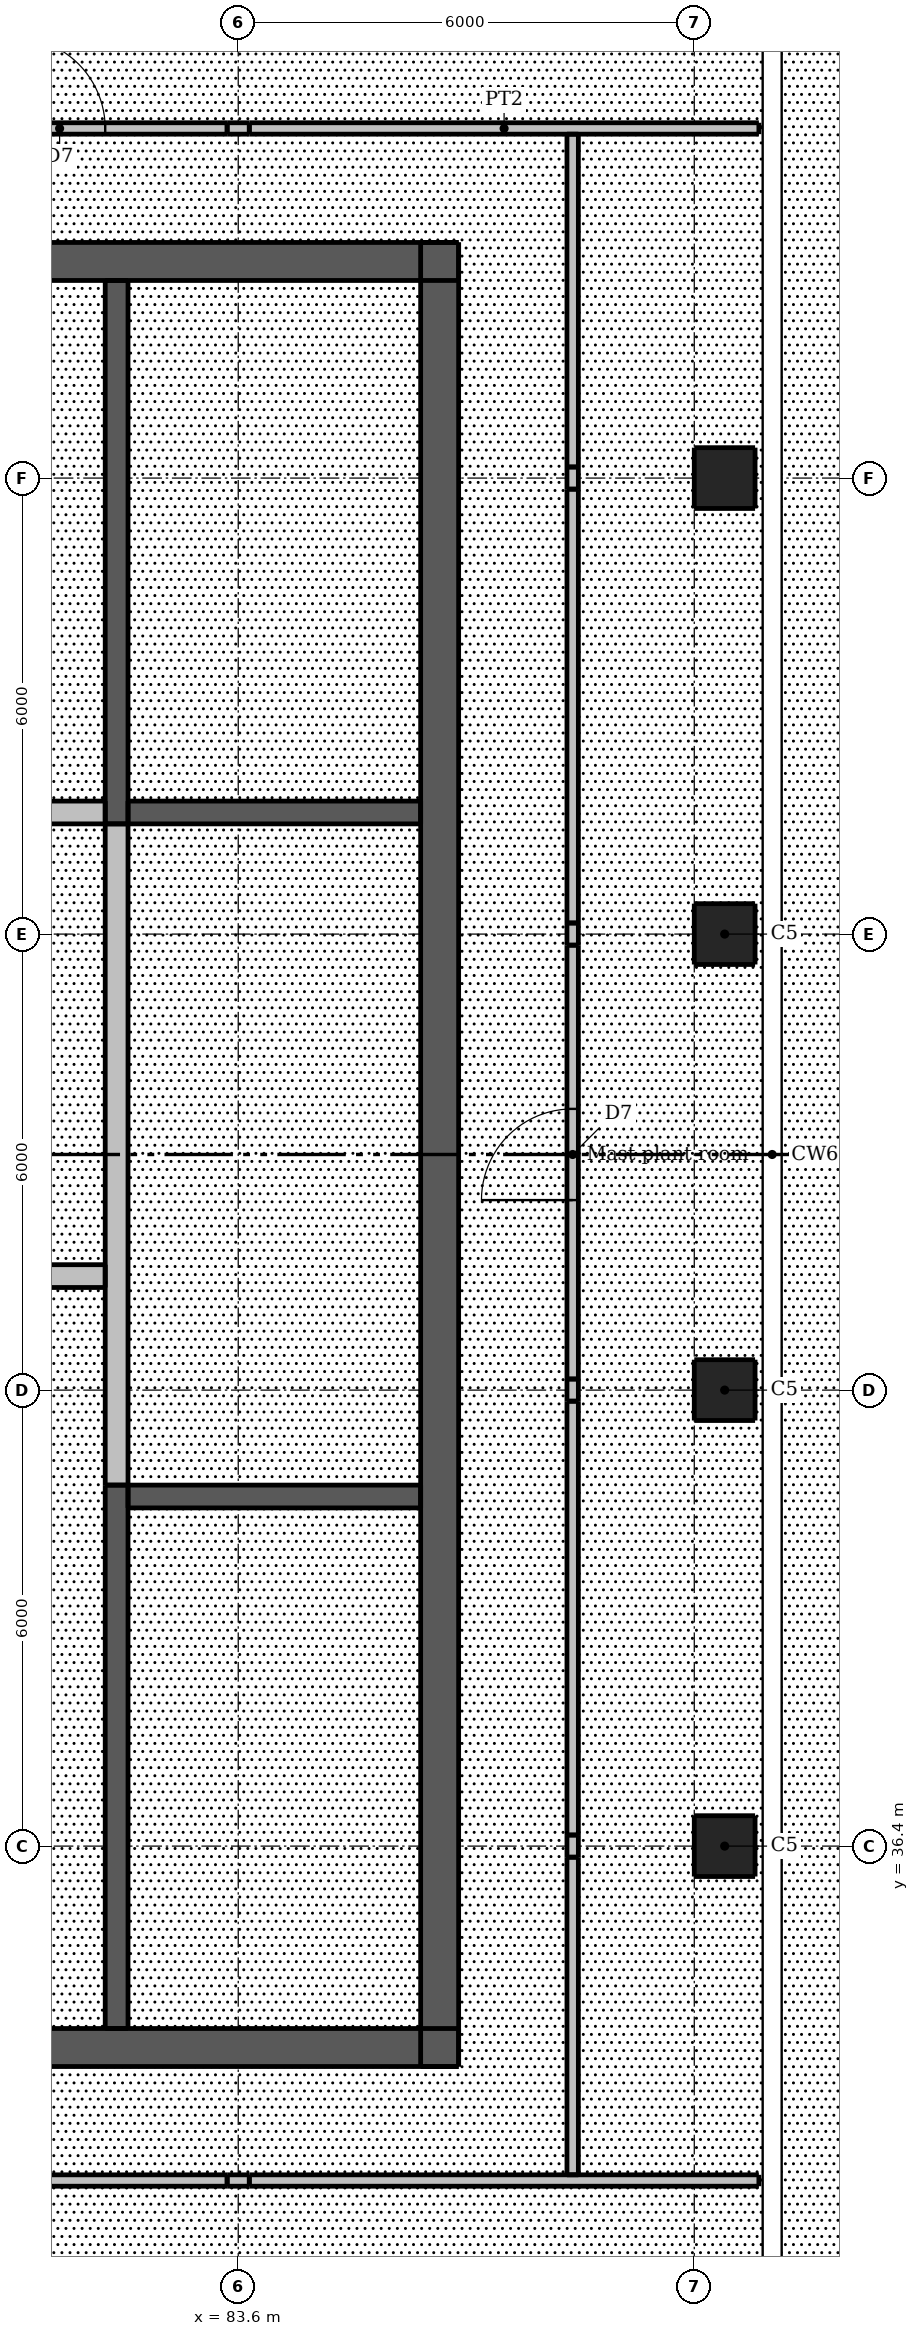
"""IFC4 building model, lengths in metres.
Left out: names, types, materials, properties, quantities, classifications, styles, units other than length and angle.
Written with IfcOpenShell. Run it as: python <this file> out.ifc"""

import sys

from ifc_helpers import new_model, si_unit, direction, frame, frame_2d, origin, origin_2d, place, context, subcontext, project, spatial, rectangle, extrude, element, fill, save


model = new_model("IFC4")
c1 = context("Model", 3, precision=1e-05, world=origin(), true_north=direction((0.0, 1.0)))
c2 = subcontext(c1, "Body", "Model", "MODEL_VIEW")
j1 = project(units=[si_unit("LENGTHUNIT", "METRE"), si_unit("PLANEANGLEUNIT", "RADIAN")], contexts=[c1])
p1 = place(None, origin())
s1 = spatial("IfcSite", under=j1, at=p1, CompositionType="ELEMENT")
p2 = place(p1, origin())
s2 = spatial("IfcBuilding", under=s1, at=p2, CompositionType="ELEMENT")
p3 = place(p2, frame((0.0, 0.0, 294.4)))
s3 = spatial("IfcBuildingStorey", under=s2, at=p3, CompositionType="ELEMENT", Elevation=294.4)
p4 = place(p3, frame((62.5, 33.75, 0.0), z_axis=(0.0, 0.0, 1.0), x_axis=(1.0, 0.0, 0.0)))
e1 = element("IfcWall", 1, at=p4, inside=s3, PredefinedType="SHEAR", context=c2, shape_type="SweptSolid", body=[
    extrude(rectangle(XDim=24.0, YDim=0.5, at=frame_2d((12.0, 0.0))), origin(), (0.0, 0.0, 1.0), 3.3),
])
p5 = place(p4, frame((1.875, 0.0, 0.0)))
e2 = element("IfcOpeningElement", 2, at=p5, cuts=e1, PredefinedType="OPENING", context=c2, shape_type="SweptSolid", body=[
    extrude(rectangle(XDim=1.1, YDim=2.1, at=frame_2d((0.55, 1.05))), frame((0.0, 0.26, 0.0), z_axis=(0.0, -1.0, 0.0), x_axis=(1.0, 0.0, 0.0)), (0.0, 0.0, 1.0), 0.52),
])
p6 = place(p4, frame((21.025, 0.0, 0.0)))
e3 = element("IfcOpeningElement", 3, at=p6, cuts=e1, PredefinedType="OPENING", context=c2, shape_type="SweptSolid", body=[
    extrude(rectangle(XDim=1.1, YDim=2.1, at=frame_2d((0.55, 1.05))), frame((0.0, 0.26, 0.0), z_axis=(0.0, -1.0, 0.0), x_axis=(1.0, 0.0, 0.0)), (0.0, 0.0, 1.0), 0.52),
])
p7 = place(p4, frame((11.55, 0.0, 0.0)))
e4 = element("IfcOpeningElement", 4, at=p7, cuts=e1, PredefinedType="OPENING", context=c2, shape_type="SweptSolid", body=[
    extrude(rectangle(XDim=0.9, YDim=2.1, at=frame_2d((0.45, 1.05))), frame((0.0, 0.26, 0.0), z_axis=(0.0, -1.0, 0.0), x_axis=(1.0, 0.0, 0.0)), (0.0, 0.0, 1.0), 0.52),
])
p8 = place(p3, frame((62.5, 57.25, 0.0), z_axis=(0.0, 0.0, 1.0), x_axis=(1.0, 0.0, 0.0)))
e5 = element("IfcWall", 5, at=p8, inside=s3, PredefinedType="SHEAR", context=c2, shape_type="SweptSolid", body=[
    extrude(rectangle(XDim=24.0, YDim=0.5, at=frame_2d((12.0, 0.0))), origin(), (0.0, 0.0, 1.0), 3.3),
])
p9 = place(p8, frame((21.025, 0.0, 0.0)))
e6 = element("IfcOpeningElement", 6, at=p9, cuts=e5, PredefinedType="OPENING", context=c2, shape_type="SweptSolid", body=[
    extrude(rectangle(XDim=1.1, YDim=2.1, at=frame_2d((0.55, 1.05))), frame((0.0, 0.26, 0.0), z_axis=(0.0, -1.0, 0.0), x_axis=(1.0, 0.0, 0.0)), (0.0, 0.0, 1.0), 0.52),
])
p10 = place(p8, frame((1.875, 0.0, 0.0)))
e7 = element("IfcOpeningElement", 7, at=p10, cuts=e5, PredefinedType="OPENING", context=c2, shape_type="SweptSolid", body=[
    extrude(rectangle(XDim=1.1, YDim=2.1, at=frame_2d((0.55, 1.05))), frame((0.0, 0.26, 0.0), z_axis=(0.0, -1.0, 0.0), x_axis=(1.0, 0.0, 0.0)), (0.0, 0.0, 1.0), 0.52),
])
p11 = place(p8, frame((11.55, 0.0, 0.0)))
e8 = element("IfcOpeningElement", 8, at=p11, cuts=e5, PredefinedType="OPENING", context=c2, shape_type="SweptSolid", body=[
    extrude(rectangle(XDim=0.9, YDim=2.1, at=frame_2d((0.45, 1.05))), frame((0.0, 0.26, 0.0), z_axis=(0.0, -1.0, 0.0), x_axis=(1.0, 0.0, 0.0)), (0.0, 0.0, 1.0), 0.52),
])
p12 = place(p3, frame((86.25, 33.5, 0.0), z_axis=(0.0, 0.0, 1.0), x_axis=(0.0, 1.0, 0.0)))
e9 = element("IfcWall", 9, at=p12, inside=s3, PredefinedType="SHEAR", context=c2, shape_type="SweptSolid", body=[
    extrude(rectangle(XDim=24.0, YDim=0.5, at=frame_2d((12.0, 0.0))), origin(), (0.0, 0.0, 1.0), 3.3),
])
p13 = place(p12, frame((11.55, 0.0, 0.0)))
e10 = element("IfcOpeningElement", 10, at=p13, cuts=e9, PredefinedType="OPENING", context=c2, shape_type="SweptSolid", body=[
    extrude(rectangle(XDim=0.9, YDim=2.1, at=frame_2d((0.45, 1.05))), frame((0.0, 0.26, 0.0), z_axis=(0.0, -1.0, 0.0), x_axis=(1.0, 0.0, 0.0)), (0.0, 0.0, 1.0), 0.52),
])
for number, where, z_axis, x_axis in (
    (11, (90.0, 36.4, 0.0), (0.0, 0.0, 1.0), (1.0, 0.0, 0.0)),
    (12, (90.0, 42.4, 0.0), (0.0, 0.0, 1.0), (1.0, 0.0, 0.0)),
    (13, (90.0, 48.4, 0.0), (0.0, 0.0, 1.0), (1.0, 0.0, 0.0)),
    (14, (90.0, 54.4, 0.0), (0.0, 0.0, 1.0), (1.0, 0.0, 0.0)),
):
    element("IfcColumn", number, at=place(p3, frame(where, z_axis=z_axis, x_axis=x_axis)), inside=s3, PredefinedType="COLUMN", context=c2, shape_type="SweptSolid", body=[
        extrude(rectangle(XDim=0.8, YDim=0.8, at=origin_2d()), origin(), (0.0, 0.0, 1.0), 3.3),
    ])
p14 = place(p3, frame((82.0, 34.0, 0.0), z_axis=(0.0, 0.0, 1.0), x_axis=(0.0, 1.0, 0.0)))
e15 = element("IfcWall", 15, at=p14, inside=s3, PredefinedType="SHEAR", context=c2, shape_type="SweptSolid", body=[
    extrude(rectangle(XDim=7.15, YDim=0.3, at=frame_2d((3.575, 0.0))), origin(), (0.0, 0.0, 1.0), 3.3),
])
p15 = place(p14, frame((0.2, 0.0, 0.0)))
e16 = element("IfcOpeningElement", 16, at=p15, cuts=e15, PredefinedType="OPENING", context=c2, shape_type="SweptSolid", body=[
    extrude(rectangle(XDim=1.1, YDim=2.1, at=frame_2d((0.55, 1.05))), frame((0.0, 0.16, 0.0), z_axis=(0.0, -1.0, 0.0), x_axis=(1.0, 0.0, 0.0)), (0.0, 0.0, 1.0), 0.32),
])
p16 = place(p3, frame((82.0, 41.15, 0.0), z_axis=(0.0, 0.0, 1.0), x_axis=(0.0, 1.0, 0.0)))
e17 = element("IfcWall", 17, at=p16, inside=s3, PredefinedType="PARTITIONING", context=c2, shape_type="SweptSolid", body=[
    extrude(rectangle(XDim=8.7, YDim=0.3, at=frame_2d((4.35, 0.0))), origin(), (0.0, 0.0, 1.0), 3.3),
])
p17 = place(p16, frame((3.9, 0.0, 0.0)))
e18 = element("IfcOpeningElement", 18, at=p17, cuts=e17, PredefinedType="OPENING", context=c2, shape_type="SweptSolid", body=[
    extrude(rectangle(XDim=0.9, YDim=2.1, at=frame_2d((0.45, 1.05))), frame((0.0, 0.16, 0.0), z_axis=(0.0, -1.0, 0.0), x_axis=(1.0, 0.0, 0.0)), (0.0, 0.0, 1.0), 0.32),
])
p18 = place(p3, frame((82.0, 49.85, 0.0), z_axis=(0.0, 0.0, 1.0), x_axis=(0.0, 1.0, 0.0)))
e19 = element("IfcWall", 19, at=p18, inside=s3, PredefinedType="SHEAR", context=c2, shape_type="SweptSolid", body=[
    extrude(rectangle(XDim=7.15, YDim=0.3, at=frame_2d((3.575, 0.0))), origin(), (0.0, 0.0, 1.0), 3.3),
])
p19 = place(p18, frame((5.85, 0.0, 0.0)))
e20 = element("IfcOpeningElement", 20, at=p19, cuts=e19, PredefinedType="OPENING", context=c2, shape_type="SweptSolid", body=[
    extrude(rectangle(XDim=1.1, YDim=2.1, at=frame_2d((0.55, 1.05))), frame((0.0, 0.16, 0.0), z_axis=(0.0, -1.0, 0.0), x_axis=(1.0, 0.0, 0.0)), (0.0, 0.0, 1.0), 0.32),
])
for number, where, z_axis, x_axis in (
    (21, (82.15, 41.0, 0.0), (0.0, 0.0, 1.0), (1.0, 0.0, 0.0)),
    (22, (82.15, 50.0, 0.0), (0.0, 0.0, 1.0), (1.0, 0.0, 0.0)),
):
    element("IfcWall", number, at=place(p3, frame(where, z_axis=z_axis, x_axis=x_axis)), inside=s3, PredefinedType="SHEAR", context=c2, shape_type="SweptSolid", body=[
        extrude(rectangle(XDim=3.85, YDim=0.3, at=frame_2d((1.925, 0.0))), origin(), (0.0, 0.0, 1.0), 3.3),
    ])
p20 = place(p3, frame((67.15, 50.0, 0.0), z_axis=(0.0, 0.0, 1.0), x_axis=(1.0, 0.0, 0.0)))
e23 = element("IfcWall", 23, at=p20, inside=s3, PredefinedType="PARTITIONING", context=c2, shape_type="SweptSolid", body=[
    extrude(rectangle(XDim=14.7, YDim=0.3, at=frame_2d((7.35, 0.0))), origin(), (0.0, 0.0, 1.0), 3.3),
])
p21 = place(p20, frame((6.9, 0.0, 0.0)))
e24 = element("IfcOpeningElement", 24, at=p21, cuts=e23, PredefinedType="OPENING", context=c2, shape_type="SweptSolid", body=[
    extrude(rectangle(XDim=0.9, YDim=2.1, at=frame_2d((0.45, 1.05))), frame((0.0, 0.16, 0.0), z_axis=(0.0, -1.0, 0.0), x_axis=(1.0, 0.0, 0.0)), (0.0, 0.0, 1.0), 0.32),
])
p22 = place(p3, frame((77.0, 43.9, 0.0), z_axis=(0.0, 0.0, 1.0), x_axis=(1.0, 0.0, 0.0)))
e25 = element("IfcWall", 25, at=p22, inside=s3, PredefinedType="PARTITIONING", context=c2, shape_type="SweptSolid", body=[
    extrude(rectangle(XDim=4.85, YDim=0.3, at=frame_2d((2.425, 0.0))), origin(), (0.0, 0.0, 1.0), 3.3),
])
p23 = place(p3, frame((77.746, 32.0, 0.0), z_axis=(0.0, 0.0, 1.0), x_axis=(1.0, 0.0, 0.0)))
e26 = element("IfcWall", 26, at=p23, inside=s3, PredefinedType="PARTITIONING", context=c2, shape_type="SweptSolid", body=[
    extrude(rectangle(XDim=5.708, YDim=0.15, at=frame_2d((2.854, 0.0))), origin(), (0.0, 0.0, 1.0), 3.3),
])
p24 = place(p3, frame((83.454, 32.0, 0.0), z_axis=(0.0, 0.0, 1.0), x_axis=(1.0, 0.0, 0.0)))
e27 = element("IfcWall", 27, at=p24, inside=s3, PredefinedType="PARTITIONING", context=c2, shape_type="SweptSolid", body=[
    extrude(rectangle(XDim=0.292, YDim=0.15, at=frame_2d((0.146, 0.0))), origin(), (0.0, 0.0, 1.0), 2.465),
])
p25 = place(p3, frame((83.746, 32.0, 0.0), z_axis=(0.0, 0.0, 1.0), x_axis=(1.0, 0.0, 0.0)))
e28 = element("IfcWall", 28, at=p25, inside=s3, PredefinedType="PARTITIONING", context=c2, shape_type="SweptSolid", body=[
    extrude(rectangle(XDim=6.704, YDim=0.15, at=frame_2d((3.352, 0.0))), origin(), (0.0, 0.0, 1.0), 3.3),
])
p26 = place(p3, frame((77.746, 59.0, 0.0), z_axis=(0.0, 0.0, 1.0), x_axis=(1.0, 0.0, 0.0)))
e29 = element("IfcWall", 29, at=p26, inside=s3, PredefinedType="PARTITIONING", context=c2, shape_type="SweptSolid", body=[
    extrude(rectangle(XDim=5.708, YDim=0.15, at=frame_2d((2.854, 0.0))), origin(), (0.0, 0.0, 1.0), 3.3),
])
p27 = place(p26, frame((2.904, 0.0, 0.0)))
e30 = element("IfcOpeningElement", 30, at=p27, cuts=e29, PredefinedType="OPENING", context=c2, shape_type="SweptSolid", body=[
    extrude(rectangle(XDim=1.2, YDim=2.1, at=frame_2d((0.6, 1.05))), frame((0.0, 0.085, 0.0), z_axis=(0.0, -1.0, 0.0), x_axis=(1.0, 0.0, 0.0)), (0.0, 0.0, 1.0), 0.17),
])
p28 = place(p3, frame((83.454, 59.0, 0.0), z_axis=(0.0, 0.0, 1.0), x_axis=(1.0, 0.0, 0.0)))
e31 = element("IfcWall", 31, at=p28, inside=s3, PredefinedType="PARTITIONING", context=c2, shape_type="SweptSolid", body=[
    extrude(rectangle(XDim=0.292, YDim=0.15, at=frame_2d((0.146, 0.0))), origin(), (0.0, 0.0, 1.0), 2.465),
])
p29 = place(p3, frame((83.746, 59.0, 0.0), z_axis=(0.0, 0.0, 1.0), x_axis=(1.0, 0.0, 0.0)))
e32 = element("IfcWall", 32, at=p29, inside=s3, PredefinedType="PARTITIONING", context=c2, shape_type="SweptSolid", body=[
    extrude(rectangle(XDim=6.704, YDim=0.15, at=frame_2d((3.352, 0.0))), origin(), (0.0, 0.0, 1.0), 3.3),
])
p30 = place(p3, frame((88.0, 32.075, 0.0), z_axis=(0.0, 0.0, 1.0), x_axis=(0.0, 1.0, 0.0)))
e33 = element("IfcWall", 33, at=p30, inside=s3, PredefinedType="PARTITIONING", context=c2, shape_type="SweptSolid", body=[
    extrude(rectangle(XDim=4.179, YDim=0.15, at=frame_2d((2.09, 0.0))), origin(), (0.0, 0.0, 1.0), 3.3),
])
p31 = place(p3, frame((88.0, 36.254, 0.0), z_axis=(0.0, 0.0, 1.0), x_axis=(0.0, 1.0, 0.0)))
e34 = element("IfcWall", 34, at=p31, inside=s3, PredefinedType="PARTITIONING", context=c2, shape_type="SweptSolid", body=[
    extrude(rectangle(XDim=0.292, YDim=0.15, at=frame_2d((0.146, 0.0))), origin(), (0.0, 0.0, 1.0), 2.465),
])
p32 = place(p3, frame((88.0, 36.546, 0.0), z_axis=(0.0, 0.0, 1.0), x_axis=(0.0, 1.0, 0.0)))
e35 = element("IfcWall", 35, at=p32, inside=s3, PredefinedType="PARTITIONING", context=c2, shape_type="SweptSolid", body=[
    extrude(rectangle(XDim=5.708, YDim=0.15, at=frame_2d((2.854, 0.0))), origin(), (0.0, 0.0, 1.0), 3.3),
])
p33 = place(p3, frame((88.0, 42.254, 0.0), z_axis=(0.0, 0.0, 1.0), x_axis=(0.0, 1.0, 0.0)))
e36 = element("IfcWall", 36, at=p33, inside=s3, PredefinedType="PARTITIONING", context=c2, shape_type="SweptSolid", body=[
    extrude(rectangle(XDim=0.292, YDim=0.15, at=frame_2d((0.146, 0.0))), origin(), (0.0, 0.0, 1.0), 2.465),
])
p34 = place(p3, frame((88.0, 42.546, 0.0), z_axis=(0.0, 0.0, 1.0), x_axis=(0.0, 1.0, 0.0)))
e37 = element("IfcWall", 37, at=p34, inside=s3, PredefinedType="PARTITIONING", context=c2, shape_type="SweptSolid", body=[
    extrude(rectangle(XDim=5.708, YDim=0.15, at=frame_2d((2.854, 0.0))), origin(), (0.0, 0.0, 1.0), 3.3),
])
p35 = place(p34, frame((2.354, 0.0, 0.0)))
e38 = element("IfcOpeningElement", 38, at=p35, cuts=e37, PredefinedType="OPENING", context=c2, shape_type="SweptSolid", body=[
    extrude(rectangle(XDim=1.2, YDim=2.1, at=frame_2d((0.6, 1.05))), frame((0.0, 0.085, 0.0), z_axis=(0.0, -1.0, 0.0), x_axis=(1.0, 0.0, 0.0)), (0.0, 0.0, 1.0), 0.17),
])
p36 = place(p3, frame((88.0, 48.254, 0.0), z_axis=(0.0, 0.0, 1.0), x_axis=(0.0, 1.0, 0.0)))
e39 = element("IfcWall", 39, at=p36, inside=s3, PredefinedType="PARTITIONING", context=c2, shape_type="SweptSolid", body=[
    extrude(rectangle(XDim=0.292, YDim=0.15, at=frame_2d((0.146, 0.0))), origin(), (0.0, 0.0, 1.0), 2.465),
])
p37 = place(p3, frame((88.0, 48.546, 0.0), z_axis=(0.0, 0.0, 1.0), x_axis=(0.0, 1.0, 0.0)))
e40 = element("IfcWall", 40, at=p37, inside=s3, PredefinedType="PARTITIONING", context=c2, shape_type="SweptSolid", body=[
    extrude(rectangle(XDim=5.708, YDim=0.15, at=frame_2d((2.854, 0.0))), origin(), (0.0, 0.0, 1.0), 3.3),
])
p38 = place(p3, frame((88.0, 54.254, 0.0), z_axis=(0.0, 0.0, 1.0), x_axis=(0.0, 1.0, 0.0)))
e41 = element("IfcWall", 41, at=p38, inside=s3, PredefinedType="PARTITIONING", context=c2, shape_type="SweptSolid", body=[
    extrude(rectangle(XDim=0.292, YDim=0.15, at=frame_2d((0.146, 0.0))), origin(), (0.0, 0.0, 1.0), 2.465),
])
p39 = place(p3, frame((88.0, 54.546, 0.0), z_axis=(0.0, 0.0, 1.0), x_axis=(0.0, 1.0, 0.0)))
e42 = element("IfcWall", 42, at=p39, inside=s3, PredefinedType="PARTITIONING", context=c2, shape_type="SweptSolid", body=[
    extrude(rectangle(XDim=4.379, YDim=0.15, at=frame_2d((2.189, 0.0))), origin(), (0.0, 0.0, 1.0), 3.3),
])
p40 = place(p15, origin())
e43 = element("IfcDoor", 43, at=p40, inside=s3, OperationType="SINGLE_SWING_RIGHT", PredefinedType="DOOR", context=c2, shape_type="SweptSolid", body=[
    extrude(rectangle(XDim=1.1, YDim=2.1, at=frame_2d((0.55, 1.05))), frame((0.0, -0.087, 0.0), z_axis=(0.0, -1.0, 0.0), x_axis=(1.0, 0.0, 0.0)), (0.0, 0.0, 1.0), 0.05),
])
fill(e16, e43)
p41 = place(p19, origin())
e44 = element("IfcDoor", 44, at=p41, inside=s3, OperationType="SINGLE_SWING_RIGHT", PredefinedType="DOOR", context=c2, shape_type="SweptSolid", body=[
    extrude(rectangle(XDim=1.1, YDim=2.1, at=frame_2d((0.55, 1.05))), frame((0.0, -0.087, 0.0), z_axis=(0.0, -1.0, 0.0), x_axis=(1.0, 0.0, 0.0)), (0.0, 0.0, 1.0), 0.05),
])
fill(e20, e44)
p42 = place(p17, origin())
e45 = element("IfcDoor", 45, at=p42, inside=s3, OperationType="SINGLE_SWING_RIGHT", PredefinedType="DOOR", context=c2, shape_type="SweptSolid", body=[
    extrude(rectangle(XDim=0.9, YDim=2.1, at=frame_2d((0.45, 1.05))), frame((0.0, -0.087, 0.0), z_axis=(0.0, -1.0, 0.0), x_axis=(1.0, 0.0, 0.0)), (0.0, 0.0, 1.0), 0.05),
])
fill(e18, e45)
p43 = place(p6, origin())
e46 = element("IfcDoor", 46, at=p43, inside=s3, OperationType="SINGLE_SWING_RIGHT", PredefinedType="DOOR", context=c2, shape_type="SweptSolid", body=[
    extrude(rectangle(XDim=1.1, YDim=2.1, at=frame_2d((0.55, 1.05))), frame((0.0, 0.237, 0.0), z_axis=(0.0, -1.0, 0.0), x_axis=(1.0, 0.0, 0.0)), (0.0, 0.0, 1.0), 0.05),
])
fill(e3, e46)
p44 = place(p9, origin())
e47 = element("IfcDoor", 47, at=p44, inside=s3, OperationType="SINGLE_SWING_RIGHT", PredefinedType="DOOR", context=c2, shape_type="SweptSolid", body=[
    extrude(rectangle(XDim=1.1, YDim=2.1, at=frame_2d((0.55, 1.05))), frame((0.0, -0.188, 0.0), z_axis=(0.0, -1.0, 0.0), x_axis=(1.0, 0.0, 0.0)), (0.0, 0.0, 1.0), 0.05),
])
fill(e6, e47)
p45 = place(p13, origin())
e48 = element("IfcDoor", 48, at=p45, inside=s3, OperationType="SINGLE_SWING_RIGHT", PredefinedType="DOOR", context=c2, shape_type="SweptSolid", body=[
    extrude(rectangle(XDim=0.9, YDim=2.1, at=frame_2d((0.45, 1.05))), frame((0.0, 0.237, 0.0), z_axis=(0.0, -1.0, 0.0), x_axis=(1.0, 0.0, 0.0)), (0.0, 0.0, 1.0), 0.05),
])
fill(e10, e48)
p46 = place(p27, origin())
e49 = element("IfcDoor", 49, at=p46, inside=s3, OperationType="SINGLE_SWING_LEFT", PredefinedType="DOOR", context=c2, shape_type="SweptSolid", body=[
    extrude(rectangle(XDim=1.2, YDim=2.1, at=frame_2d((0.6, 1.05))), frame((0.0, 0.025, 0.0), z_axis=(0.0, -1.0, 0.0), x_axis=(1.0, 0.0, 0.0)), (0.0, 0.0, 1.0), 0.05),
])
fill(e30, e49)
p47 = place(p35, origin())
e50 = element("IfcDoor", 50, at=p47, inside=s3, OperationType="SINGLE_SWING_LEFT", PredefinedType="DOOR", context=c2, shape_type="SweptSolid", body=[
    extrude(rectangle(XDim=1.2, YDim=2.1, at=frame_2d((0.6, 1.05))), frame((0.0, 0.025, 0.0), z_axis=(0.0, -1.0, 0.0), x_axis=(1.0, 0.0, 0.0)), (0.0, 0.0, 1.0), 0.05),
])
fill(e38, e50)
save(model, sys.argv[1])
